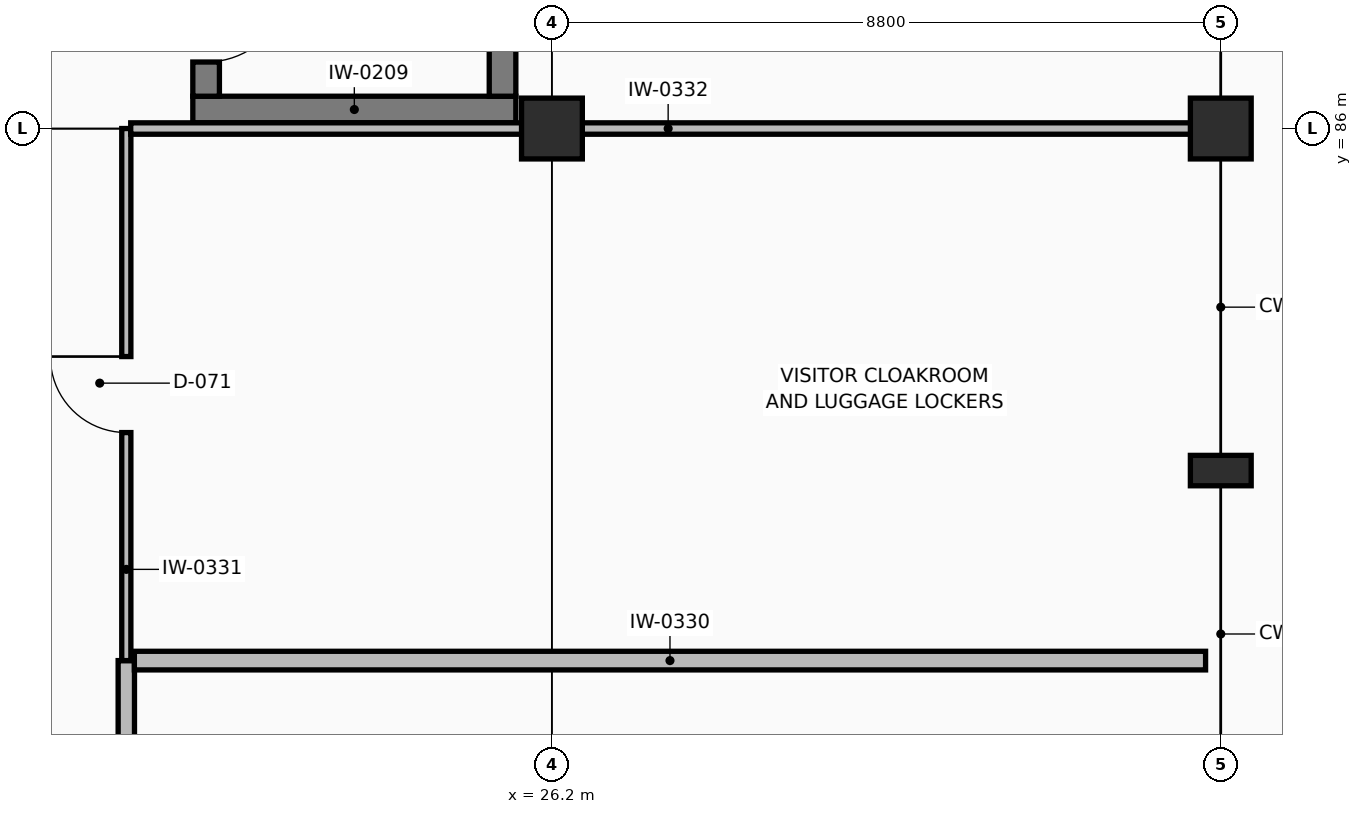
"""IFC4 building model, lengths in metres.
Left out: names, types, materials, properties, quantities, classifications, styles, units other than length and angle.
Written with IfcOpenShell. Run it as: python <this file> out.ifc"""

import sys

from ifc_helpers import new_model, si_unit, direction, frame, frame_2d, origin, origin_2d, place, context, subcontext, project, spatial, rectangle, extrude, element, fill, save


model = new_model("IFC4")
c1 = context("Model", 3, precision=1e-05, world=origin(), true_north=direction((0.0, 1.0)))
c2 = subcontext(c1, "Body", "Model", "MODEL_VIEW")
j1 = project(units=[si_unit("LENGTHUNIT", "METRE"), si_unit("PLANEANGLEUNIT", "RADIAN")], contexts=[c1])
p1 = place(None, origin())
s1 = spatial("IfcSite", under=j1, at=p1, CompositionType="ELEMENT")
p2 = place(p1, origin())
s2 = spatial("IfcBuilding", under=s1, at=p2, CompositionType="ELEMENT")
p3 = place(p2, origin())
s3 = spatial("IfcBuildingStorey", under=s2, at=p3, CompositionType="ELEMENT", Elevation=0.0)
for number, where, z_axis, x_axis in (
    (1, (26.2, 86.0, 0.0), (0.0, 0.0, 1.0), (1.0, 0.0, 0.0)),
    (2, (35.0, 86.0, 0.0), (0.0, 0.0, 1.0), (1.0, 0.0, 0.0)),
):
    element("IfcColumn", number, at=place(p3, frame(where, z_axis=z_axis, x_axis=x_axis)), inside=s3, PredefinedType="COLUMN", context=c2, shape_type="SweptSolid", body=[
        extrude(rectangle(XDim=0.8, YDim=0.8, at=origin_2d()), origin(), (0.0, 0.0, 1.0), 4.8),
    ])
p4 = place(p3, frame((35.0, 81.5, 0.0), z_axis=(0.0, 0.0, 1.0), x_axis=(0.0, 1.0, 0.0)))
e3 = element("IfcColumn", 3, at=p4, inside=s3, PredefinedType="PILASTER", context=c2, shape_type="SweptSolid", body=[
    extrude(rectangle(XDim=0.4, YDim=0.8, at=origin_2d()), origin(), (0.0, 0.0, 1.0), 4.8),
])
p5 = place(p3, frame((21.475, 86.25, 0.0), z_axis=(0.0, 0.0, 1.0), x_axis=(1.0, 0.0, 0.0)))
e4 = element("IfcWall", 4, at=p5, inside=s3, PredefinedType="SHEAR", context=c2, shape_type="SweptSolid", body=[
    extrude(rectangle(XDim=4.25, YDim=0.35, at=frame_2d((2.125, 0.0))), origin(), (0.0, 0.0, 1.0), 4.49),
])
p6 = place(p3, frame((25.55, 86.425, 0.0), z_axis=(0.0, 0.0, 1.0), x_axis=(0.0, 1.0, 0.0)))
e5 = element("IfcWall", 5, at=p6, inside=s3, PredefinedType="SHEAR", context=c2, shape_type="SweptSolid", body=[
    extrude(rectangle(XDim=7.55, YDim=0.35, at=frame_2d((3.775, 0.0))), origin(), (0.0, 0.0, 1.0), 4.49),
])
p7 = place(p3, frame((21.65, 93.975, 0.0), z_axis=(0.0, 0.0, 1.0), x_axis=(0.0, -1.0, 0.0)))
e6 = element("IfcWall", 6, at=p7, inside=s3, PredefinedType="SHEAR", context=c2, shape_type="SweptSolid", body=[
    extrude(rectangle(XDim=7.55, YDim=0.35, at=frame_2d((3.775, 0.0))), origin(), (0.0, 0.0, 1.0), 4.49),
])
p8 = place(p7, frame((6.0, 0.0, 0.0)))
e7 = element("IfcOpeningElement", 7, at=p8, cuts=e6, PredefinedType="OPENING", context=c2, shape_type="SweptSolid", body=[
    extrude(rectangle(XDim=1.1, YDim=2.2, at=frame_2d((0.55, 1.1))), frame((0.0, 0.185, 0.0), z_axis=(0.0, -1.0, 0.0), x_axis=(1.0, 0.0, 0.0)), (0.0, 0.0, 1.0), 0.37),
])
p9 = place(p3, frame((20.6, 64.2, 0.0), z_axis=(0.0, 0.0, 1.0), x_axis=(0.0, 1.0, 0.0)))
e8 = element("IfcWall", 8, at=p9, inside=s3, PredefinedType="PARTITIONING", context=c2, shape_type="SweptSolid", body=[
    extrude(rectangle(XDim=14.8, YDim=0.215, at=frame_2d((7.4, 0.0))), origin(), (0.0, 0.0, 1.0), 2.638),
])
p10 = place(p9, frame((6.4, 0.0, 0.0)))
e9 = element("IfcOpeningElement", 9, at=p10, cuts=e8, PredefinedType="OPENING", context=c2, shape_type="SweptSolid", body=[
    extrude(rectangle(XDim=2.0, YDim=2.4, at=frame_2d((1.0, 1.2))), frame((0.0, 0.117, 0.0), z_axis=(0.0, -1.0, 0.0), x_axis=(1.0, 0.0, 0.0)), (0.0, 0.0, 1.0), 0.235),
])
p11 = place(p3, frame((20.706, 79.0, 0.0), z_axis=(0.0, 0.0, 1.0), x_axis=(1.0, 0.0, 0.0)))
e10 = element("IfcWall", 10, at=p11, inside=s3, PredefinedType="PARTITIONING", context=c2, shape_type="SweptSolid", body=[
    extrude(rectangle(XDim=14.094, YDim=0.245, at=frame_2d((7.047, 0.0))), origin(), (0.0, 0.0, 1.0), 3.737),
])
p12 = place(p3, frame((20.6, 79.0, 0.0), z_axis=(0.0, 0.0, 1.0), x_axis=(0.0, 1.0, 0.0)))
e11 = element("IfcWall", 11, at=p12, inside=s3, PredefinedType="PARTITIONING", context=c2, shape_type="SweptSolid", body=[
    extrude(rectangle(XDim=7.0, YDim=0.12, at=frame_2d((3.5, 0.0))), origin(), (0.0, 0.0, 1.0), 3.737),
])
p13 = place(p12, frame((3.0, 0.0, 0.0)))
e12 = element("IfcOpeningElement", 12, at=p13, cuts=e11, PredefinedType="OPENING", context=c2, shape_type="SweptSolid", body=[
    extrude(rectangle(XDim=1.0, YDim=2.15, at=frame_2d((0.5, 1.075))), frame((0.0, 0.07, 0.0), z_axis=(0.0, -1.0, 0.0), x_axis=(1.0, 0.0, 0.0)), (0.0, 0.0, 1.0), 0.14),
])
p14 = place(p3, frame((20.658, 86.0, 0.0), z_axis=(0.0, 0.0, 1.0), x_axis=(1.0, 0.0, 0.0)))
e13 = element("IfcWall", 13, at=p14, inside=s3, PredefinedType="PARTITIONING", context=c2, shape_type="SweptSolid", body=[
    extrude(rectangle(XDim=14.142, YDim=0.15, at=frame_2d((7.071, 0.0))), origin(), (0.0, 0.0, 1.0), 3.737),
])
p15 = place(p8, origin())
e14 = element("IfcDoor", 14, at=p15, inside=s3, OperationType="SINGLE_SWING_LEFT", PredefinedType="DOOR", context=c2, shape_type="SweptSolid", body=[
    extrude(rectangle(XDim=1.1, YDim=2.2, at=frame_2d((0.55, 1.1))), frame((0.0, 0.025, 0.0), z_axis=(0.0, -1.0, 0.0), x_axis=(1.0, 0.0, 0.0)), (0.0, 0.0, 1.0), 0.05),
])
fill(e7, e14)
p16 = place(p13, origin())
e15 = element("IfcDoor", 15, at=p16, inside=s3, OperationType="SINGLE_SWING_RIGHT", PredefinedType="DOOR", context=c2, shape_type="SweptSolid", body=[
    extrude(rectangle(XDim=1.0, YDim=2.15, at=frame_2d((0.5, 1.075))), frame((0.0, 0.025, 0.0), z_axis=(0.0, -1.0, 0.0), x_axis=(1.0, 0.0, 0.0)), (0.0, 0.0, 1.0), 0.05),
])
fill(e12, e15)
save(model, sys.argv[1])
